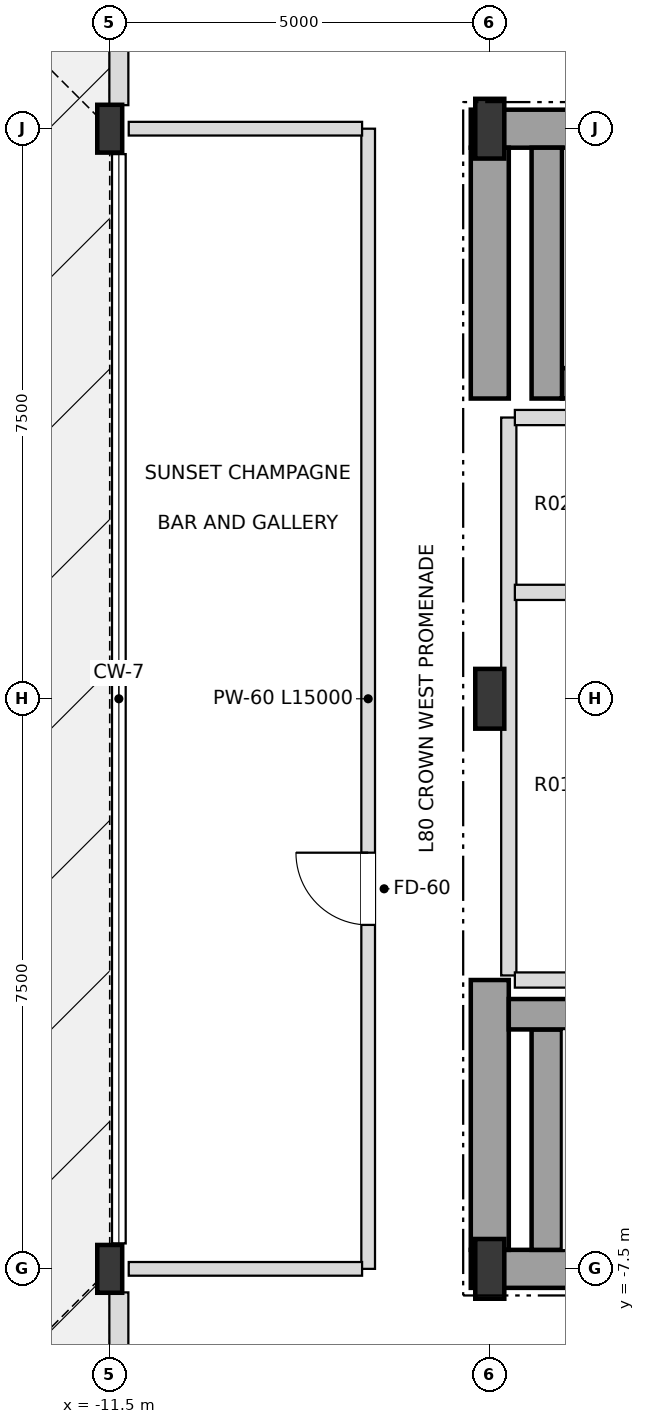
"""IFC4 building model, lengths in metres.
Left out: names, types, materials, properties, quantities, classifications, styles, units other than length and angle.
Written with IfcOpenShell. Run it as: python <this file> out.ifc"""

import sys

from ifc_helpers import new_model, si_unit, direction, frame, frame_2d, origin, origin_2d, place, context, subcontext, project, spatial, rectangle, i_section, extrude, element, fill, save


model = new_model("IFC4")
c1 = context("Model", 3, precision=1e-05, world=origin(), true_north=direction((0.0, 1.0)))
c2 = subcontext(c1, "Body", "Model", "MODEL_VIEW")
j1 = project(units=[si_unit("LENGTHUNIT", "METRE"), si_unit("PLANEANGLEUNIT", "RADIAN")], contexts=[c1])
p1 = place(None, origin())
s1 = spatial("IfcSite", under=j1, at=p1, CompositionType="ELEMENT")
p2 = place(p1, origin())
s2 = spatial("IfcBuilding", under=s1, at=p2, CompositionType="ELEMENT")
p3 = place(p2, frame((0.0, 0.0, 305.1)))
s3 = spatial("IfcBuildingStorey", under=s2, at=p3, CompositionType="ELEMENT", Elevation=305.1)
for number, where, z_axis, x_axis in (
    (1, (-6.5, -7.5, 0.0), (0.0, 0.0, 1.0), (1.0, 0.0, 0.0)),
    (2, (-6.5, 0.0, 0.0), (0.0, 0.0, 1.0), (1.0, 0.0, 0.0)),
    (3, (-6.5, 7.5, 0.0), (0.0, 0.0, 1.0), (1.0, 0.0, 0.0)),
):
    element("IfcColumn", number, at=place(p3, frame(where, z_axis=z_axis, x_axis=x_axis)), inside=s3, PredefinedType="COLUMN", context=c2, shape_type="SweptSolid", body=[
        extrude(i_section(OverallWidth=0.382, OverallDepth=0.786, WebThickness=0.02, FlangeThickness=0.033, at=origin_2d()), origin(), (0.0, 0.0, 1.0), 4.8),
    ])
for number, where, z_axis, x_axis in (
    (4, (-11.5, -7.5, 0.0), (0.0, 0.0, 1.0), (1.0, 0.0, 0.0)),
    (5, (-11.5, 7.5, 0.0), (0.0, 0.0, 1.0), (1.0, 0.0, 0.0)),
):
    element("IfcColumn", number, at=place(p3, frame(where, z_axis=z_axis, x_axis=x_axis)), inside=s3, PredefinedType="COLUMN", context=c2, shape_type="SweptSolid", body=[
        extrude(i_section(OverallWidth=0.328, OverallDepth=0.629, WebThickness=0.014, FlangeThickness=0.021, at=origin_2d()), origin(), (0.0, 0.0, 1.0), 4.8),
    ])
for number, where, z_axis, x_axis in (
    (6, (-11.38, 11.155, 0.0), (0.0, 0.0, 1.0), (0.0, -1.0, 0.0)),
    (7, (-11.38, -7.81, 0.0), (0.0, 0.0, 1.0), (0.0, -1.0, 0.0)),
):
    element("IfcWall", number, at=place(p3, frame(where, z_axis=z_axis, x_axis=x_axis)), inside=s3, PredefinedType="SOLIDWALL", context=c2, shape_type="SweptSolid", body=[
        extrude(rectangle(XDim=3.345, YDim=0.25, at=frame_2d((1.673, 0.0))), origin(), (0.0, 0.0, 1.0), 4.55),
    ])
p4 = place(p3, frame((-6.75, -7.5, 0.0), z_axis=(0.0, 0.0, 1.0), x_axis=(1.0, 0.0, 0.0)))
e8 = element("IfcWall", 8, at=p4, inside=s3, PredefinedType="SHEAR", context=c2, shape_type="SweptSolid", body=[
    extrude(rectangle(XDim=6.75, YDim=0.5, at=frame_2d((3.375, 0.0))), origin(), (0.0, 0.0, 1.0), 4.55),
])
p5 = place(p3, frame((-6.75, 7.5, 0.0), z_axis=(0.0, 0.0, 1.0), x_axis=(1.0, 0.0, 0.0)))
e9 = element("IfcWall", 9, at=p5, inside=s3, PredefinedType="SHEAR", context=c2, shape_type="SweptSolid", body=[
    extrude(rectangle(XDim=6.75, YDim=0.5, at=frame_2d((3.375, 0.0))), origin(), (0.0, 0.0, 1.0), 4.55),
])
p6 = place(p5, frame((1.65, 0.0, 0.0)))
e10 = element("IfcOpeningElement", 10, at=p6, cuts=e9, PredefinedType="OPENING", context=c2, shape_type="SweptSolid", body=[
    extrude(rectangle(XDim=1.05, YDim=2.15, at=frame_2d((0.525, 1.075))), frame((0.0, 0.26, 0.0), z_axis=(0.0, -1.0, 0.0), x_axis=(1.0, 0.0, 0.0)), (0.0, 0.0, 1.0), 0.52),
])
p7 = place(p3, frame((-6.5, -7.25, 0.0), z_axis=(0.0, 0.0, 1.0), x_axis=(0.0, 1.0, 0.0)))
e11 = element("IfcWall", 11, at=p7, inside=s3, PredefinedType="SHEAR", context=c2, shape_type="SweptSolid", body=[
    extrude(rectangle(XDim=3.55, YDim=0.5, at=frame_2d((1.775, 0.0))), origin(), (0.0, 0.0, 1.0), 4.55),
])
p8 = place(p3, frame((-6.5, 3.95, 0.0), z_axis=(0.0, 0.0, 1.0), x_axis=(0.0, 1.0, 0.0)))
e12 = element("IfcWall", 12, at=p8, inside=s3, PredefinedType="SHEAR", context=c2, shape_type="SweptSolid", body=[
    extrude(rectangle(XDim=3.3, YDim=0.5, at=frame_2d((1.65, 0.0))), origin(), (0.0, 0.0, 1.0), 4.55),
])
p9 = place(p3, frame((-5.75, -7.25, 0.0), z_axis=(0.0, 0.0, 1.0), x_axis=(0.0, 1.0, 0.0)))
e13 = element("IfcWall", 13, at=p9, inside=s3, PredefinedType="SHEAR", context=c2, shape_type="SweptSolid", body=[
    extrude(rectangle(XDim=2.9, YDim=0.4, at=frame_2d((1.45, 0.0))), origin(), (0.0, 0.0, 1.0), 4.55),
])
p10 = place(p3, frame((-6.25, -4.15, 0.0), z_axis=(0.0, 0.0, 1.0), x_axis=(1.0, 0.0, 0.0)))
e14 = element("IfcWall", 14, at=p10, inside=s3, PredefinedType="SHEAR", context=c2, shape_type="SweptSolid", body=[
    extrude(rectangle(XDim=7.78, YDim=0.4, at=frame_2d((3.89, 0.0))), origin(), (0.0, 0.0, 1.0), 4.55),
])
p11 = place(p3, frame((-5.55, 4.15, 0.0), z_axis=(0.0, 0.0, 1.0), x_axis=(1.0, 0.0, 0.0)))
e15 = element("IfcWall", 15, at=p11, inside=s3, PredefinedType="SHEAR", context=c2, shape_type="SweptSolid", body=[
    extrude(rectangle(XDim=7.08, YDim=0.4, at=frame_2d((3.54, 0.0))), origin(), (0.0, 0.0, 1.0), 4.55),
])
p12 = place(p3, frame((-5.75, 3.95, 0.0), z_axis=(0.0, 0.0, 1.0), x_axis=(0.0, 1.0, 0.0)))
e16 = element("IfcWall", 16, at=p12, inside=s3, PredefinedType="SHEAR", context=c2, shape_type="SweptSolid", body=[
    extrude(rectangle(XDim=3.3, YDim=0.4, at=frame_2d((1.65, 0.0))), origin(), (0.0, 0.0, 1.0), 4.55),
])
p13 = place(p3, frame((-8.1, -7.5, 0.0), z_axis=(0.0, 0.0, 1.0), x_axis=(0.0, 1.0, 0.0)))
e17 = element("IfcWall", 17, at=p13, inside=s3, PredefinedType="PARTITIONING", context=c2, shape_type="SweptSolid", body=[
    extrude(rectangle(XDim=15.0, YDim=0.18, at=frame_2d((7.5, 0.0))), origin(), (0.0, 0.0, 1.0), 4.55),
])
p14 = place(p13, frame((4.525, 0.0, 0.0)))
e18 = element("IfcOpeningElement", 18, at=p14, cuts=e17, PredefinedType="OPENING", context=c2, shape_type="SweptSolid", body=[
    extrude(rectangle(XDim=0.95, YDim=2.15, at=frame_2d((0.475, 1.075))), frame((0.0, 0.1, 0.0), z_axis=(0.0, -1.0, 0.0), x_axis=(1.0, 0.0, 0.0)), (0.0, 0.0, 1.0), 0.2),
])
p15 = place(p3, frame((-6.25, -3.64, 0.0), z_axis=(0.0, 0.0, 1.0), x_axis=(0.0, 1.0, 0.0)))
e19 = element("IfcWall", 19, at=p15, inside=s3, PredefinedType="SOLIDWALL", context=c2, shape_type="SweptSolid", body=[
    extrude(rectangle(XDim=7.34, YDim=0.2, at=frame_2d((3.67, 0.0))), origin(), (0.0, 0.0, 1.0), 4.55),
])
p16 = place(p3, frame((-11.25, -7.5, 0.0), z_axis=(0.0, 0.0, 1.0), x_axis=(1.0, 0.0, 0.0)))
e20 = element("IfcWall", 20, at=p16, inside=s3, PredefinedType="PARTITIONING", context=c2, shape_type="SweptSolid", body=[
    extrude(rectangle(XDim=3.07, YDim=0.18, at=frame_2d((1.535, 0.0))), origin(), (0.0, 0.0, 1.0), 4.218),
])
for number, where, z_axis, x_axis in (
    (21, (-6.17, -3.7, 0.0), (0.0, 0.0, 1.0), (1.0, 0.0, 0.0)),
    (22, (-6.17, 1.4, 0.0), (0.0, 0.0, 1.0), (1.0, 0.0, 0.0)),
    (23, (-6.17, 3.7, 0.0), (0.0, 0.0, 1.0), (1.0, 0.0, 0.0)),
):
    element("IfcWall", number, at=place(p3, frame(where, z_axis=z_axis, x_axis=x_axis)), inside=s3, PredefinedType="SOLIDWALL", context=c2, shape_type="SweptSolid", body=[
        extrude(rectangle(XDim=1.94, YDim=0.2, at=frame_2d((0.97, 0.0))), origin(), (0.0, 0.0, 1.0), 4.55),
    ])
p17 = place(p3, frame((-11.25, 7.5, 0.0), z_axis=(0.0, 0.0, 1.0), x_axis=(1.0, 0.0, 0.0)))
e24 = element("IfcWall", 24, at=p17, inside=s3, PredefinedType="PARTITIONING", context=c2, shape_type="SweptSolid", body=[
    extrude(rectangle(XDim=3.07, YDim=0.18, at=frame_2d((1.535, 0.0))), origin(), (0.0, 0.0, 1.0), 4.218),
])
p18 = place(p14, origin())
e25 = element("IfcDoor", 25, at=p18, inside=s3, OperationType="SINGLE_SWING_RIGHT", PredefinedType="DOOR", context=c2, shape_type="SweptSolid", body=[
    extrude(rectangle(XDim=0.95, YDim=2.15, at=frame_2d((0.475, 1.075))), frame((0.0, 0.025, 0.0), z_axis=(0.0, -1.0, 0.0), x_axis=(1.0, 0.0, 0.0)), (0.0, 0.0, 1.0), 0.05),
])
fill(e18, e25)
save(model, sys.argv[1])
